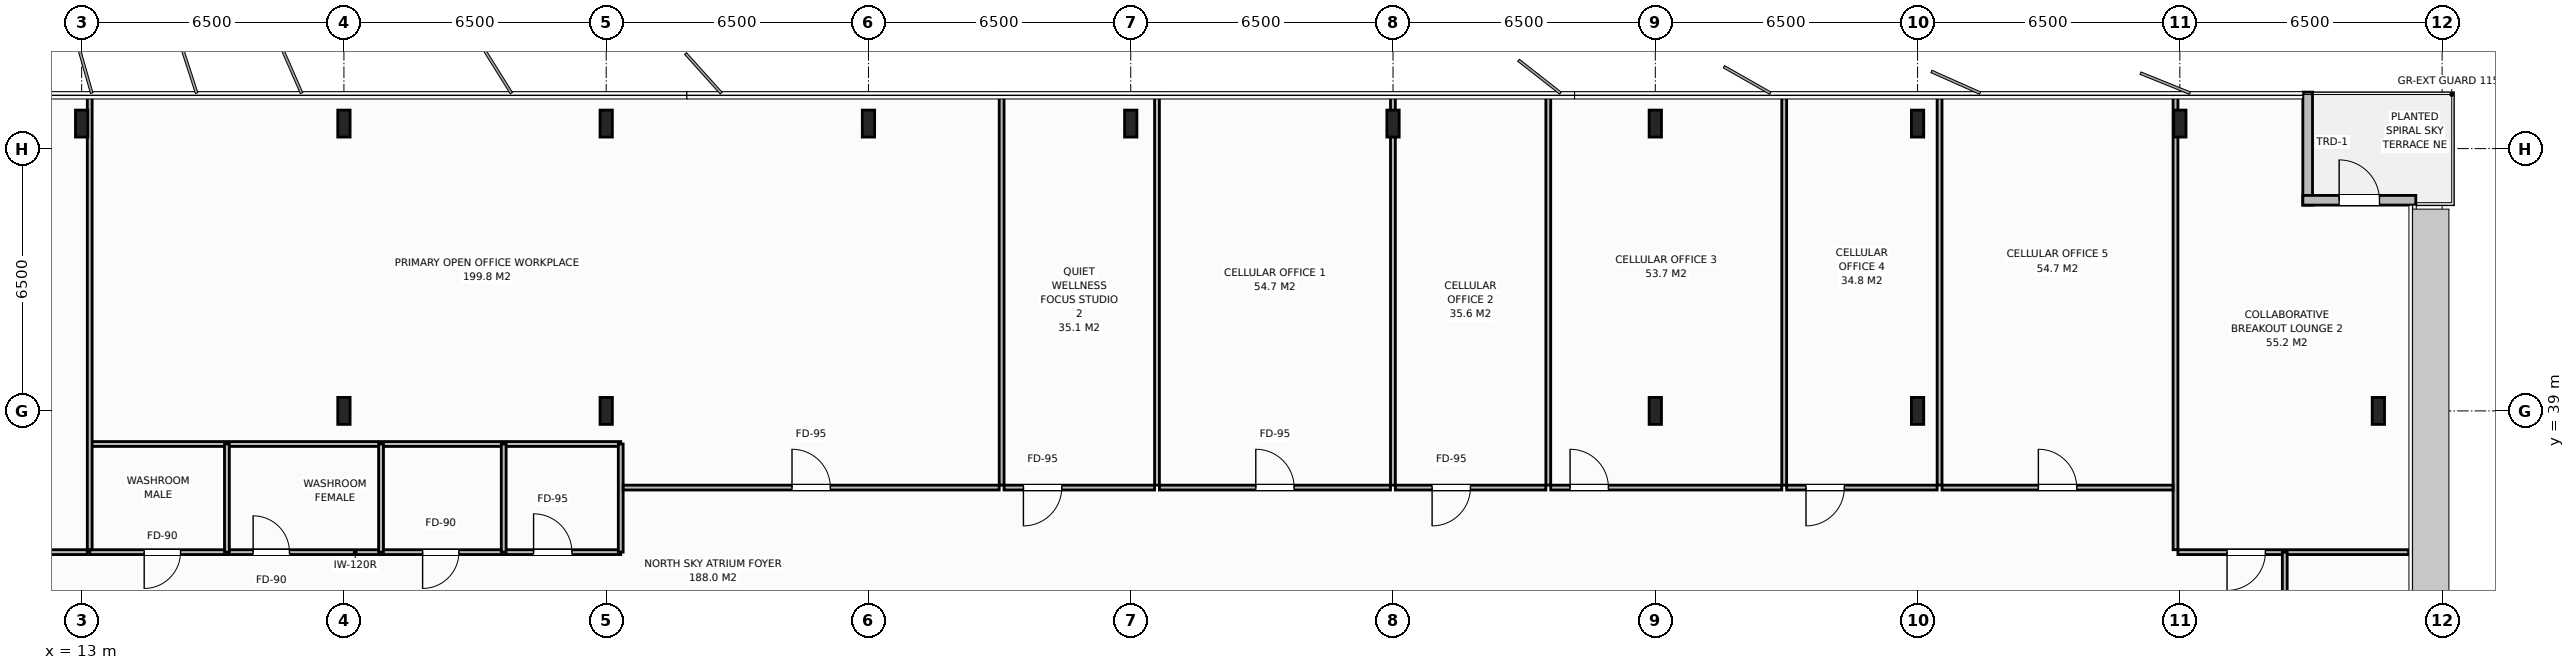
"""IFC4 building model, lengths in metres.
Left out: names, types, materials, properties, quantities, classifications, styles, units other than length and angle.
Written with IfcOpenShell. Run it as: python <this file> out.ifc"""

import sys

from ifc_helpers import new_model, si_unit, direction, frame, frame_2d, origin, origin_2d, place, context, subcontext, project, spatial, rectangle, i_section, extrude, element, fill, save


model = new_model("IFC4")
c1 = context("Model", 3, precision=1e-05, world=origin(), true_north=direction((0.0, 1.0)))
c2 = subcontext(c1, "Body", "Model", "MODEL_VIEW")
j1 = project(units=[si_unit("LENGTHUNIT", "METRE"), si_unit("PLANEANGLEUNIT", "RADIAN")], contexts=[c1])
p1 = place(None, origin())
s1 = spatial("IfcSite", under=j1, at=p1, CompositionType="ELEMENT")
p2 = place(p1, origin())
s2 = spatial("IfcBuilding", under=s1, at=p2, CompositionType="ELEMENT")
p3 = place(p2, frame((0.0, 0.0, 259.4)))
s3 = spatial("IfcBuildingStorey", under=s2, at=p3, CompositionType="ELEMENT", Elevation=259.4)
for number, where, z_axis, x_axis in (
    (1, (19.5, 39.0, 0.0), (0.0, 0.0, 1.0), (1.0, 0.0, 0.0)),
    (2, (58.5, 39.0, 0.0), (0.0, 0.0, 1.0), (1.0, 0.0, 0.0)),
    (3, (26.0, 39.0, 0.0), (0.0, 0.0, 1.0), (1.0, 0.0, 0.0)),
    (4, (52.0, 39.0, 0.0), (0.0, 0.0, 1.0), (1.0, 0.0, 0.0)),
    (5, (13.0, 46.12, 0.0), (0.0, 0.0, 1.0), (1.0, 0.0, 0.0)),
    (6, (19.5, 46.12, 0.0), (0.0, 0.0, 1.0), (1.0, 0.0, 0.0)),
    (7, (26.0, 46.12, 0.0), (0.0, 0.0, 1.0), (1.0, 0.0, 0.0)),
    (8, (32.5, 46.12, 0.0), (0.0, 0.0, 1.0), (1.0, 0.0, 0.0)),
    (9, (39.0, 46.12, 0.0), (0.0, 0.0, 1.0), (1.0, 0.0, 0.0)),
    (10, (45.5, 46.12, 0.0), (0.0, 0.0, 1.0), (1.0, 0.0, 0.0)),
    (11, (52.0, 46.12, 0.0), (0.0, 0.0, 1.0), (1.0, 0.0, 0.0)),
    (12, (58.5, 46.12, 0.0), (0.0, 0.0, 1.0), (1.0, 0.0, 0.0)),
    (13, (65.0, 46.12, 0.0), (0.0, 0.0, 1.0), (1.0, 0.0, 0.0)),
    (14, (69.92, 39.0, 0.0), (0.0, 0.0, 1.0), (1.0, 0.0, 0.0)),
):
    element("IfcColumn", number, at=place(p3, frame(where, z_axis=z_axis, x_axis=x_axis)), inside=s3, PredefinedType="COLUMN", context=c2, shape_type="SweptSolid", body=[
        extrude(i_section(OverallWidth=0.305, OverallDepth=0.668, WebThickness=0.021, FlangeThickness=0.04, at=origin_2d()), origin(), (0.0, 0.0, 1.0), 3.8),
    ])
p4 = place(p3, frame((68.168, 46.9, 0.0), z_axis=(0.0, 0.0, 1.0), x_axis=(0.0, -1.0, 0.0)))
e15 = element("IfcWall", 15, at=p4, inside=s3, PredefinedType="STANDARD", context=c2, shape_type="SweptSolid", body=[
    extrude(rectangle(XDim=2.8, YDim=0.24, at=frame_2d((1.4, 0.0))), origin(), (0.0, 0.0, 1.0), 3.588),
])
p5 = place(p3, frame((68.048, 44.22, 0.0), z_axis=(0.0, 0.0, 1.0), x_axis=(1.0, 0.0, 0.0)))
e16 = element("IfcWall", 16, at=p5, inside=s3, PredefinedType="STANDARD", context=c2, shape_type="SweptSolid", body=[
    extrude(rectangle(XDim=2.8, YDim=0.24, at=frame_2d((1.4, 0.0))), origin(), (0.0, 0.0, 1.0), 3.588),
])
p6 = place(p5, frame((0.9, 0.0, 0.0)))
e17 = element("IfcOpeningElement", 17, at=p6, cuts=e16, PredefinedType="OPENING", context=c2, shape_type="SweptSolid", body=[
    extrude(rectangle(XDim=1.0, YDim=2.2, at=frame_2d((0.5, 1.1))), frame((0.0, 0.13, 0.0), z_axis=(0.0, -1.0, 0.0), x_axis=(1.0, 0.0, 0.0)), (0.0, 0.0, 1.0), 0.26),
])
p7 = place(p3, frame((13.2, 35.5, 0.0), z_axis=(0.0, 0.0, 1.0), x_axis=(1.0, 0.0, 0.0)))
e18 = element("IfcWall", 18, at=p7, inside=s3, PredefinedType="PARTITIONING", context=c2, shape_type="SweptSolid", body=[
    extrude(rectangle(XDim=13.16, YDim=0.12, at=frame_2d((6.58, 0.0))), origin(), (0.0, 0.0, 1.0), 3.588),
])
p8 = place(p7, frame((1.35, 0.0, 0.0)))
e19 = element("IfcOpeningElement", 19, at=p8, cuts=e18, PredefinedType="OPENING", context=c2, shape_type="SweptSolid", body=[
    extrude(rectangle(XDim=0.9, YDim=2.15, at=frame_2d((0.45, 1.075))), frame((0.0, 0.07, 0.0), z_axis=(0.0, -1.0, 0.0), x_axis=(1.0, 0.0, 0.0)), (0.0, 0.0, 1.0), 0.14),
])
p9 = place(p7, frame((4.05, 0.0, 0.0)))
e20 = element("IfcOpeningElement", 20, at=p9, cuts=e18, PredefinedType="OPENING", context=c2, shape_type="SweptSolid", body=[
    extrude(rectangle(XDim=0.9, YDim=2.15, at=frame_2d((0.45, 1.075))), frame((0.0, 0.07, 0.0), z_axis=(0.0, -1.0, 0.0), x_axis=(1.0, 0.0, 0.0)), (0.0, 0.0, 1.0), 0.14),
])
p10 = place(p7, frame((8.25, 0.0, 0.0)))
e21 = element("IfcOpeningElement", 21, at=p10, cuts=e18, PredefinedType="OPENING", context=c2, shape_type="SweptSolid", body=[
    extrude(rectangle(XDim=0.9, YDim=2.15, at=frame_2d((0.45, 1.075))), frame((0.0, 0.07, 0.0), z_axis=(0.0, -1.0, 0.0), x_axis=(1.0, 0.0, 0.0)), (0.0, 0.0, 1.0), 0.14),
])
p11 = place(p7, frame((11.0, 0.0, 0.0)))
e22 = element("IfcOpeningElement", 22, at=p11, cuts=e18, PredefinedType="OPENING", context=c2, shape_type="SweptSolid", body=[
    extrude(rectangle(XDim=0.95, YDim=2.15, at=frame_2d((0.475, 1.075))), frame((0.0, 0.07, 0.0), z_axis=(0.0, -1.0, 0.0), x_axis=(1.0, 0.0, 0.0)), (0.0, 0.0, 1.0), 0.14),
])
p12 = place(p3, frame((13.2, 38.18, 0.0), z_axis=(0.0, 0.0, 1.0), x_axis=(1.0, 0.0, 0.0)))
e23 = element("IfcWall", 23, at=p12, inside=s3, PredefinedType="PARTITIONING", context=c2, shape_type="SweptSolid", body=[
    extrude(rectangle(XDim=13.16, YDim=0.12, at=frame_2d((6.58, 0.0))), origin(), (0.0, 0.0, 1.0), 3.588),
])
for number, where, z_axis, x_axis in (
    (24, (16.6, 35.5, 0.0), (0.0, 0.0, 1.0), (0.0, 1.0, 0.0)),
    (25, (20.42, 35.5, 0.0), (0.0, 0.0, 1.0), (0.0, 1.0, 0.0)),
    (26, (23.46, 35.5, 0.0), (0.0, 0.0, 1.0), (0.0, 1.0, 0.0)),
    (27, (26.36, 35.5, 0.0), (0.0, 0.0, 1.0), (0.0, 1.0, 0.0)),
):
    element("IfcWall", number, at=place(p3, frame(where, z_axis=z_axis, x_axis=x_axis)), inside=s3, PredefinedType="PARTITIONING", context=c2, shape_type="SweptSolid", body=[
        extrude(rectangle(XDim=2.68, YDim=0.12, at=frame_2d((1.34, 0.0))), origin(), (0.0, 0.0, 1.0), 3.588),
    ])
p13 = place(p3, frame((13.2, 35.56, 0.0), z_axis=(0.0, 0.0, 1.0), x_axis=(0.0, 1.0, 0.0)))
e28 = element("IfcWall", 28, at=p13, inside=s3, PredefinedType="PARTITIONING", context=c2, shape_type="SweptSolid", body=[
    extrude(rectangle(XDim=11.32, YDim=0.12, at=frame_2d((5.66, 0.0))), origin(), (0.0, 0.0, 1.0), 2.788),
])
p14 = place(p3, frame((7.38, 35.5, 0.0), z_axis=(0.0, 0.0, 1.0), x_axis=(1.0, 0.0, 0.0)))
e29 = element("IfcWall", 29, at=p14, inside=s3, PredefinedType="PARTITIONING", context=c2, shape_type="SweptSolid", body=[
    extrude(rectangle(XDim=5.76, YDim=0.12, at=frame_2d((2.88, 0.0))), origin(), (0.0, 0.0, 1.0), 3.588),
])
p15 = place(p14, frame((3.5, 0.0, 0.0)))
e30 = element("IfcOpeningElement", 30, at=p15, cuts=e29, PredefinedType="OPENING", context=c2, shape_type="SweptSolid", body=[
    extrude(rectangle(XDim=0.95, YDim=2.15, at=frame_2d((0.475, 1.075))), frame((0.0, 0.07, 0.0), z_axis=(0.0, -1.0, 0.0), x_axis=(1.0, 0.0, 0.0)), (0.0, 0.0, 1.0), 0.14),
])
p16 = place(p3, frame((35.8, 37.16, 0.0), z_axis=(0.0, 0.0, 1.0), x_axis=(0.0, 1.0, 0.0)))
e31 = element("IfcWall", 31, at=p16, inside=s3, PredefinedType="PARTITIONING", context=c2, shape_type="SweptSolid", body=[
    extrude(rectangle(XDim=9.72, YDim=0.12, at=frame_2d((4.86, 0.0))), origin(), (0.0, 0.0, 1.0), 3.588),
])
p17 = place(p3, frame((26.42, 37.1, 0.0), z_axis=(0.0, 0.0, 1.0), x_axis=(1.0, 0.0, 0.0)))
e32 = element("IfcWall", 32, at=p17, inside=s3, PredefinedType="PARTITIONING", context=c2, shape_type="SweptSolid", body=[
    extrude(rectangle(XDim=9.32, YDim=0.12, at=frame_2d((4.66, 0.0))), origin(), (0.0, 0.0, 1.0), 3.588),
])
p18 = place(p17, frame((4.185, 0.0, 0.0)))
e33 = element("IfcOpeningElement", 33, at=p18, cuts=e32, PredefinedType="OPENING", context=c2, shape_type="SweptSolid", body=[
    extrude(rectangle(XDim=0.95, YDim=2.15, at=frame_2d((0.475, 1.075))), frame((0.0, 0.07, 0.0), z_axis=(0.0, -1.0, 0.0), x_axis=(1.0, 0.0, 0.0)), (0.0, 0.0, 1.0), 0.14),
])
p19 = place(p3, frame((39.65, 37.16, 0.0), z_axis=(0.0, 0.0, 1.0), x_axis=(0.0, 1.0, 0.0)))
e34 = element("IfcWall", 34, at=p19, inside=s3, PredefinedType="PARTITIONING", context=c2, shape_type="SweptSolid", body=[
    extrude(rectangle(XDim=9.72, YDim=0.12, at=frame_2d((4.86, 0.0))), origin(), (0.0, 0.0, 1.0), 3.588),
])
p20 = place(p3, frame((35.86, 37.1, 0.0), z_axis=(0.0, 0.0, 1.0), x_axis=(1.0, 0.0, 0.0)))
e35 = element("IfcWall", 35, at=p20, inside=s3, PredefinedType="PARTITIONING", context=c2, shape_type="SweptSolid", body=[
    extrude(rectangle(XDim=3.73, YDim=0.12, at=frame_2d((1.865, 0.0))), origin(), (0.0, 0.0, 1.0), 3.588),
])
p21 = place(p20, frame((0.48, 0.0, 0.0)))
e36 = element("IfcOpeningElement", 36, at=p21, cuts=e35, PredefinedType="OPENING", context=c2, shape_type="SweptSolid", body=[
    extrude(rectangle(XDim=0.95, YDim=2.15, at=frame_2d((0.475, 1.075))), frame((0.0, 0.07, 0.0), z_axis=(0.0, -1.0, 0.0), x_axis=(1.0, 0.0, 0.0)), (0.0, 0.0, 1.0), 0.14),
])
p22 = place(p3, frame((45.497, 37.16, 0.0), z_axis=(0.0, 0.0, 1.0), x_axis=(0.0, 1.0, 0.0)))
e37 = element("IfcWall", 37, at=p22, inside=s3, PredefinedType="PARTITIONING", context=c2, shape_type="SweptSolid", body=[
    extrude(rectangle(XDim=9.72, YDim=0.12, at=frame_2d((4.86, 0.0))), origin(), (0.0, 0.0, 1.0), 2.788),
])
p23 = place(p3, frame((39.71, 37.1, 0.0), z_axis=(0.0, 0.0, 1.0), x_axis=(1.0, 0.0, 0.0)))
e38 = element("IfcWall", 38, at=p23, inside=s3, PredefinedType="PARTITIONING", context=c2, shape_type="SweptSolid", body=[
    extrude(rectangle(XDim=5.727, YDim=0.12, at=frame_2d((2.864, 0.0))), origin(), (0.0, 0.0, 1.0), 3.588),
])
p24 = place(p23, frame((2.388, 0.0, 0.0)))
e39 = element("IfcOpeningElement", 39, at=p24, cuts=e38, PredefinedType="OPENING", context=c2, shape_type="SweptSolid", body=[
    extrude(rectangle(XDim=0.95, YDim=2.15, at=frame_2d((0.475, 1.075))), frame((0.0, 0.07, 0.0), z_axis=(0.0, -1.0, 0.0), x_axis=(1.0, 0.0, 0.0)), (0.0, 0.0, 1.0), 0.14),
])
p25 = place(p3, frame((49.348, 37.16, 0.0), z_axis=(0.0, 0.0, 1.0), x_axis=(0.0, 1.0, 0.0)))
e40 = element("IfcWall", 40, at=p25, inside=s3, PredefinedType="PARTITIONING", context=c2, shape_type="SweptSolid", body=[
    extrude(rectangle(XDim=9.72, YDim=0.12, at=frame_2d((4.86, 0.0))), origin(), (0.0, 0.0, 1.0), 3.588),
])
p26 = place(p3, frame((45.557, 37.1, 0.0), z_axis=(0.0, 0.0, 1.0), x_axis=(1.0, 0.0, 0.0)))
e41 = element("IfcWall", 41, at=p26, inside=s3, PredefinedType="PARTITIONING", context=c2, shape_type="SweptSolid", body=[
    extrude(rectangle(XDim=3.73, YDim=0.12, at=frame_2d((1.865, 0.0))), origin(), (0.0, 0.0, 1.0), 3.588),
])
p27 = place(p26, frame((0.911, 0.0, 0.0)))
e42 = element("IfcOpeningElement", 42, at=p27, cuts=e41, PredefinedType="OPENING", context=c2, shape_type="SweptSolid", body=[
    extrude(rectangle(XDim=0.95, YDim=2.15, at=frame_2d((0.475, 1.075))), frame((0.0, 0.07, 0.0), z_axis=(0.0, -1.0, 0.0), x_axis=(1.0, 0.0, 0.0)), (0.0, 0.0, 1.0), 0.14),
])
p28 = place(p3, frame((55.195, 37.16, 0.0), z_axis=(0.0, 0.0, 1.0), x_axis=(0.0, 1.0, 0.0)))
e43 = element("IfcWall", 43, at=p28, inside=s3, PredefinedType="PARTITIONING", context=c2, shape_type="SweptSolid", body=[
    extrude(rectangle(XDim=9.72, YDim=0.12, at=frame_2d((4.86, 0.0))), origin(), (0.0, 0.0, 1.0), 3.588),
])
p29 = place(p3, frame((49.408, 37.1, 0.0), z_axis=(0.0, 0.0, 1.0), x_axis=(1.0, 0.0, 0.0)))
e44 = element("IfcWall", 44, at=p29, inside=s3, PredefinedType="PARTITIONING", context=c2, shape_type="SweptSolid", body=[
    extrude(rectangle(XDim=5.727, YDim=0.12, at=frame_2d((2.863, 0.0))), origin(), (0.0, 0.0, 1.0), 3.588),
])
p30 = place(p29, frame((0.48, 0.0, 0.0)))
e45 = element("IfcOpeningElement", 45, at=p30, cuts=e44, PredefinedType="OPENING", context=c2, shape_type="SweptSolid", body=[
    extrude(rectangle(XDim=0.95, YDim=2.15, at=frame_2d((0.475, 1.075))), frame((0.0, 0.07, 0.0), z_axis=(0.0, -1.0, 0.0), x_axis=(1.0, 0.0, 0.0)), (0.0, 0.0, 1.0), 0.14),
])
p31 = place(p3, frame((59.045, 37.16, 0.0), z_axis=(0.0, 0.0, 1.0), x_axis=(0.0, 1.0, 0.0)))
e46 = element("IfcWall", 46, at=p31, inside=s3, PredefinedType="PARTITIONING", context=c2, shape_type="SweptSolid", body=[
    extrude(rectangle(XDim=9.72, YDim=0.12, at=frame_2d((4.86, 0.0))), origin(), (0.0, 0.0, 1.0), 3.588),
])
p32 = place(p3, frame((55.255, 37.1, 0.0), z_axis=(0.0, 0.0, 1.0), x_axis=(1.0, 0.0, 0.0)))
e47 = element("IfcWall", 47, at=p32, inside=s3, PredefinedType="PARTITIONING", context=c2, shape_type="SweptSolid", body=[
    extrude(rectangle(XDim=3.73, YDim=0.12, at=frame_2d((1.865, 0.0))), origin(), (0.0, 0.0, 1.0), 3.588),
])
p33 = place(p32, frame((0.48, 0.0, 0.0)))
e48 = element("IfcOpeningElement", 48, at=p33, cuts=e47, PredefinedType="OPENING", context=c2, shape_type="SweptSolid", body=[
    extrude(rectangle(XDim=0.95, YDim=2.15, at=frame_2d((0.475, 1.075))), frame((0.0, 0.07, 0.0), z_axis=(0.0, -1.0, 0.0), x_axis=(1.0, 0.0, 0.0)), (0.0, 0.0, 1.0), 0.14),
])
p34 = place(p3, frame((64.892, 35.56, 0.0), z_axis=(0.0, 0.0, 1.0), x_axis=(0.0, 1.0, 0.0)))
e49 = element("IfcWall", 49, at=p34, inside=s3, PredefinedType="PARTITIONING", context=c2, shape_type="SweptSolid", body=[
    extrude(rectangle(XDim=11.32, YDim=0.12, at=frame_2d((5.66, 0.0))), origin(), (0.0, 0.0, 1.0), 2.788),
])
p35 = place(p3, frame((59.105, 37.1, 0.0), z_axis=(0.0, 0.0, 1.0), x_axis=(1.0, 0.0, 0.0)))
e50 = element("IfcWall", 50, at=p35, inside=s3, PredefinedType="PARTITIONING", context=c2, shape_type="SweptSolid", body=[
    extrude(rectangle(XDim=5.727, YDim=0.12, at=frame_2d((2.864, 0.0))), origin(), (0.0, 0.0, 1.0), 3.588),
])
p36 = place(p35, frame((2.388, 0.0, 0.0)))
e51 = element("IfcOpeningElement", 51, at=p36, cuts=e50, PredefinedType="OPENING", context=c2, shape_type="SweptSolid", body=[
    extrude(rectangle(XDim=0.95, YDim=2.15, at=frame_2d((0.475, 1.075))), frame((0.0, 0.07, 0.0), z_axis=(0.0, -1.0, 0.0), x_axis=(1.0, 0.0, 0.0)), (0.0, 0.0, 1.0), 0.14),
])
p37 = place(p3, frame((64.952, 35.5, 0.0), z_axis=(0.0, 0.0, 1.0), x_axis=(1.0, 0.0, 0.0)))
e52 = element("IfcWall", 52, at=p37, inside=s3, PredefinedType="PARTITIONING", context=c2, shape_type="SweptSolid", body=[
    extrude(rectangle(XDim=5.716, YDim=0.12, at=frame_2d((2.858, 0.0))), origin(), (0.0, 0.0, 1.0), 3.588),
])
p38 = place(p37, frame((1.218, 0.0, 0.0)))
e53 = element("IfcOpeningElement", 53, at=p38, cuts=e52, PredefinedType="OPENING", context=c2, shape_type="SweptSolid", body=[
    extrude(rectangle(XDim=0.95, YDim=2.15, at=frame_2d((0.475, 1.075))), frame((0.0, 0.07, 0.0), z_axis=(0.0, -1.0, 0.0), x_axis=(1.0, 0.0, 0.0)), (0.0, 0.0, 1.0), 0.14),
])
p39 = place(p3, frame((67.6, 16.5, 0.0), z_axis=(0.0, 0.0, 1.0), x_axis=(0.0, 1.0, 0.0)))
e54 = element("IfcWall", 54, at=p39, inside=s3, PredefinedType="PARTITIONING", context=c2, shape_type="SweptSolid", body=[
    extrude(rectangle(XDim=19.0, YDim=0.12, at=frame_2d((9.5, 0.0))), origin(), (0.0, 0.0, 1.0), 3.588),
])
p40 = place(p39, frame((9.025, 0.0, 0.0)))
e55 = element("IfcOpeningElement", 55, at=p40, cuts=e54, PredefinedType="OPENING", context=c2, shape_type="SweptSolid", body=[
    extrude(rectangle(XDim=0.95, YDim=2.15, at=frame_2d((0.475, 1.075))), frame((0.0, 0.07, 0.0), z_axis=(0.0, -1.0, 0.0), x_axis=(1.0, 0.0, 0.0)), (0.0, 0.0, 1.0), 0.14),
])
p41 = place(p6, origin())
e56 = element("IfcDoor", 56, at=p41, inside=s3, OperationType="SINGLE_SWING_LEFT", PredefinedType="DOOR", context=c2, shape_type="SweptSolid", body=[
    extrude(rectangle(XDim=1.0, YDim=2.2, at=frame_2d((0.5, 1.1))), frame((0.0, 0.025, 0.0), z_axis=(0.0, -1.0, 0.0), x_axis=(1.0, 0.0, 0.0)), (0.0, 0.0, 1.0), 0.05),
])
fill(e17, e56)
p42 = place(p8, origin())
e57 = element("IfcDoor", 57, at=p42, inside=s3, OperationType="SINGLE_SWING_RIGHT", PredefinedType="DOOR", context=c2, shape_type="SweptSolid", body=[
    extrude(rectangle(XDim=0.9, YDim=2.15, at=frame_2d((0.45, 1.075))), frame((0.0, 0.025, 0.0), z_axis=(0.0, -1.0, 0.0), x_axis=(1.0, 0.0, 0.0)), (0.0, 0.0, 1.0), 0.05),
])
fill(e19, e57)
p43 = place(p9, origin())
e58 = element("IfcDoor", 58, at=p43, inside=s3, OperationType="SINGLE_SWING_LEFT", PredefinedType="DOOR", context=c2, shape_type="SweptSolid", body=[
    extrude(rectangle(XDim=0.9, YDim=2.15, at=frame_2d((0.45, 1.075))), frame((0.0, 0.025, 0.0), z_axis=(0.0, -1.0, 0.0), x_axis=(1.0, 0.0, 0.0)), (0.0, 0.0, 1.0), 0.05),
])
fill(e20, e58)
p44 = place(p10, origin())
e59 = element("IfcDoor", 59, at=p44, inside=s3, OperationType="SINGLE_SWING_RIGHT", PredefinedType="DOOR", context=c2, shape_type="SweptSolid", body=[
    extrude(rectangle(XDim=0.9, YDim=2.15, at=frame_2d((0.45, 1.075))), frame((0.0, 0.025, 0.0), z_axis=(0.0, -1.0, 0.0), x_axis=(1.0, 0.0, 0.0)), (0.0, 0.0, 1.0), 0.05),
])
fill(e21, e59)
p45 = place(p11, origin())
e60 = element("IfcDoor", 60, at=p45, inside=s3, OperationType="SINGLE_SWING_LEFT", PredefinedType="DOOR", context=c2, shape_type="SweptSolid", body=[
    extrude(rectangle(XDim=0.95, YDim=2.15, at=frame_2d((0.475, 1.075))), frame((0.0, 0.025, 0.0), z_axis=(0.0, -1.0, 0.0), x_axis=(1.0, 0.0, 0.0)), (0.0, 0.0, 1.0), 0.05),
])
fill(e22, e60)
p46 = place(p18, origin())
e61 = element("IfcDoor", 61, at=p46, inside=s3, OperationType="SINGLE_SWING_LEFT", PredefinedType="DOOR", context=c2, shape_type="SweptSolid", body=[
    extrude(rectangle(XDim=0.95, YDim=2.15, at=frame_2d((0.475, 1.075))), frame((0.0, 0.025, 0.0), z_axis=(0.0, -1.0, 0.0), x_axis=(1.0, 0.0, 0.0)), (0.0, 0.0, 1.0), 0.05),
])
fill(e33, e61)
p47 = place(p21, origin())
e62 = element("IfcDoor", 62, at=p47, inside=s3, OperationType="SINGLE_SWING_RIGHT", PredefinedType="DOOR", context=c2, shape_type="SweptSolid", body=[
    extrude(rectangle(XDim=0.95, YDim=2.15, at=frame_2d((0.475, 1.075))), frame((0.0, 0.025, 0.0), z_axis=(0.0, -1.0, 0.0), x_axis=(1.0, 0.0, 0.0)), (0.0, 0.0, 1.0), 0.05),
])
fill(e36, e62)
p48 = place(p24, origin())
e63 = element("IfcDoor", 63, at=p48, inside=s3, OperationType="SINGLE_SWING_LEFT", PredefinedType="DOOR", context=c2, shape_type="SweptSolid", body=[
    extrude(rectangle(XDim=0.95, YDim=2.15, at=frame_2d((0.475, 1.075))), frame((0.0, 0.025, 0.0), z_axis=(0.0, -1.0, 0.0), x_axis=(1.0, 0.0, 0.0)), (0.0, 0.0, 1.0), 0.05),
])
fill(e39, e63)
p49 = place(p27, origin())
e64 = element("IfcDoor", 64, at=p49, inside=s3, OperationType="SINGLE_SWING_RIGHT", PredefinedType="DOOR", context=c2, shape_type="SweptSolid", body=[
    extrude(rectangle(XDim=0.95, YDim=2.15, at=frame_2d((0.475, 1.075))), frame((0.0, 0.025, 0.0), z_axis=(0.0, -1.0, 0.0), x_axis=(1.0, 0.0, 0.0)), (0.0, 0.0, 1.0), 0.05),
])
fill(e42, e64)
p50 = place(p30, origin())
e65 = element("IfcDoor", 65, at=p50, inside=s3, OperationType="SINGLE_SWING_LEFT", PredefinedType="DOOR", context=c2, shape_type="SweptSolid", body=[
    extrude(rectangle(XDim=0.95, YDim=2.15, at=frame_2d((0.475, 1.075))), frame((0.0, 0.025, 0.0), z_axis=(0.0, -1.0, 0.0), x_axis=(1.0, 0.0, 0.0)), (0.0, 0.0, 1.0), 0.05),
])
fill(e45, e65)
p51 = place(p33, origin())
e66 = element("IfcDoor", 66, at=p51, inside=s3, OperationType="SINGLE_SWING_RIGHT", PredefinedType="DOOR", context=c2, shape_type="SweptSolid", body=[
    extrude(rectangle(XDim=0.95, YDim=2.15, at=frame_2d((0.475, 1.075))), frame((0.0, 0.025, 0.0), z_axis=(0.0, -1.0, 0.0), x_axis=(1.0, 0.0, 0.0)), (0.0, 0.0, 1.0), 0.05),
])
fill(e48, e66)
p52 = place(p36, origin())
e67 = element("IfcDoor", 67, at=p52, inside=s3, OperationType="SINGLE_SWING_LEFT", PredefinedType="DOOR", context=c2, shape_type="SweptSolid", body=[
    extrude(rectangle(XDim=0.95, YDim=2.15, at=frame_2d((0.475, 1.075))), frame((0.0, 0.025, 0.0), z_axis=(0.0, -1.0, 0.0), x_axis=(1.0, 0.0, 0.0)), (0.0, 0.0, 1.0), 0.05),
])
fill(e51, e67)
p53 = place(p38, origin())
e68 = element("IfcDoor", 68, at=p53, inside=s3, OperationType="SINGLE_SWING_RIGHT", PredefinedType="DOOR", context=c2, shape_type="SweptSolid", body=[
    extrude(rectangle(XDim=0.95, YDim=2.15, at=frame_2d((0.475, 1.075))), frame((0.0, 0.025, 0.0), z_axis=(0.0, -1.0, 0.0), x_axis=(1.0, 0.0, 0.0)), (0.0, 0.0, 1.0), 0.05),
])
fill(e53, e68)
save(model, sys.argv[1])
